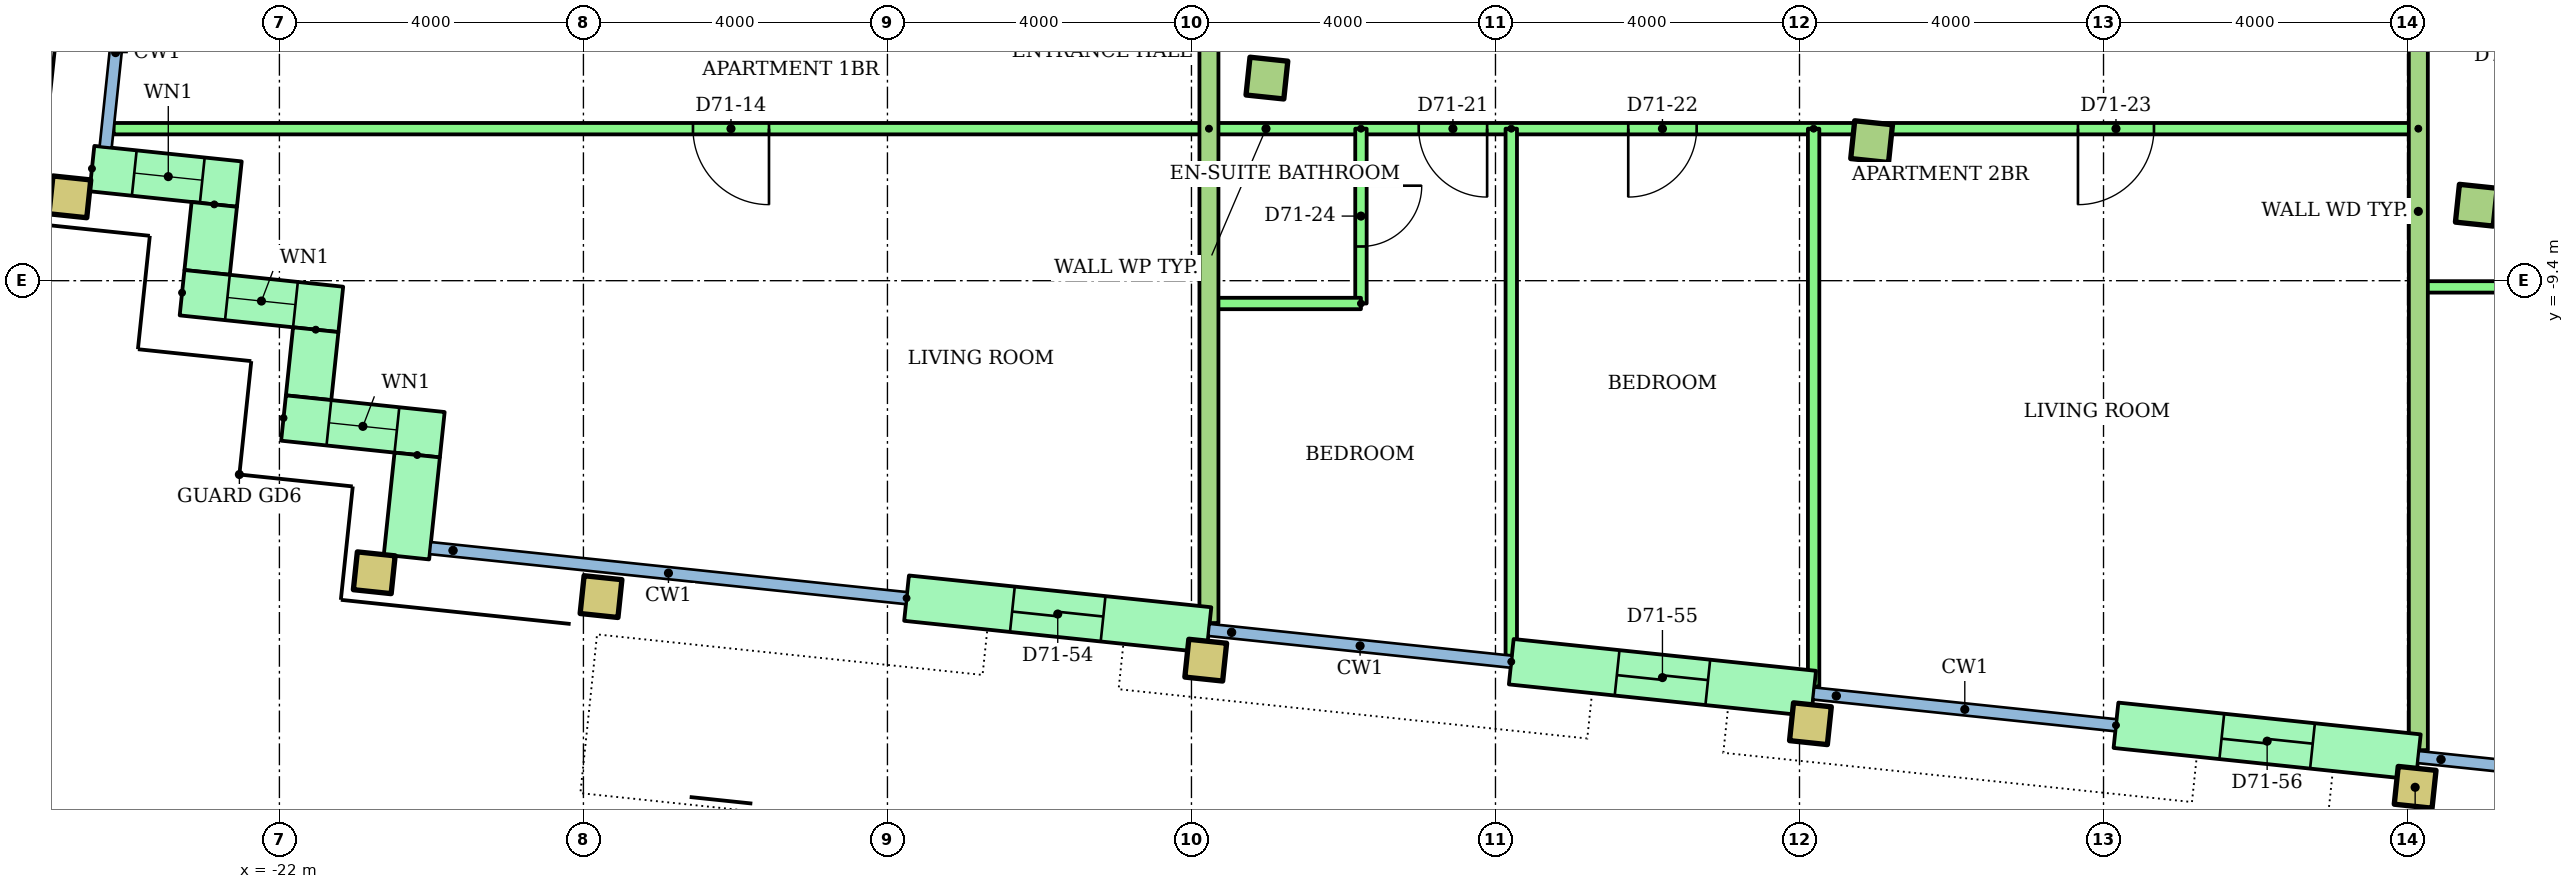
"""IFC4 building model, lengths in metres.
Left out: names, types, materials, properties, quantities, classifications, styles, units other than length and angle.
Written with IfcOpenShell. Run it as: python <this file> out.ifc"""

import sys

from ifc_helpers import new_model, si_unit, direction, frame, frame_2d, origin, origin_2d, place, context, subcontext, project, spatial, rectangle, hollow_rectangle, extrude, element, fill, save


model = new_model("IFC4")
c1 = context("Model", 3, precision=1e-05, world=origin(), true_north=direction((0.0, 1.0)))
c2 = subcontext(c1, "Body", "Model", "MODEL_VIEW")
j1 = project(units=[si_unit("LENGTHUNIT", "METRE"), si_unit("PLANEANGLEUNIT", "RADIAN")], contexts=[c1])
p1 = place(None, origin())
s1 = spatial("IfcSite", under=j1, at=p1, CompositionType="ELEMENT")
p2 = place(p1, origin())
s2 = spatial("IfcBuilding", under=s1, at=p2, CompositionType="ELEMENT")
p3 = place(p2, frame((0.0, 0.0, 272.3)))
s3 = spatial("IfcBuildingStorey", under=s2, at=p3, CompositionType="ELEMENT", Elevation=272.3)
for number, where, z_axis, x_axis in (
    (1, (-20.752, -13.243, 0.0), (0.0, 0.0, 1.0), (0.995, -0.105, 0.0)),
    (2, (-17.768, -13.556, 0.0), (0.0, 0.0, 1.0), (0.995, -0.105, 0.0)),
    (3, (-9.812, -14.392, 0.0), (0.0, 0.0, 1.0), (0.995, -0.105, 0.0)),
    (4, (-1.856, -15.229, 0.0), (0.0, 0.0, 1.0), (0.995, -0.105, 0.0)),
    (5, (6.1, -16.065, 0.0), (0.0, 0.0, 1.0), (0.995, -0.105, 0.0)),
    (6, (-24.757, -8.297, 0.0), (0.0, 0.0, 1.0), (0.995, -0.105, 0.0)),
):
    element("IfcColumn", number, at=place(p3, frame(where, z_axis=z_axis, x_axis=x_axis)), inside=s3, PredefinedType="COLUMN", context=c2, shape_type="SweptSolid", body=[
        extrude(hollow_rectangle(XDim=0.5, YDim=0.5, WallThickness=0.025, at=origin_2d()), origin(), (0.0, 0.0, 1.0), 3.2),
    ])
for number, where, z_axis, x_axis in (
    (7, (-9.007, -6.735, 0.0), (0.0, 0.0, 1.0), (0.995, -0.105, 0.0)),
    (8, (-1.051, -7.571, 0.0), (0.0, 0.0, 1.0), (0.995, -0.105, 0.0)),
    (9, (6.905, -8.407, 0.0), (0.0, 0.0, 1.0), (0.995, -0.105, 0.0)),
):
    element("IfcColumn", number, at=place(p3, frame(where, z_axis=z_axis, x_axis=x_axis)), inside=s3, PredefinedType="COLUMN", context=c2, shape_type="SweptSolid", body=[
        extrude(rectangle(XDim=0.5, YDim=0.5, at=origin_2d()), origin(), (0.0, 0.0, 1.0), 3.2),
    ])
p4 = place(p3, frame((-24.467, -7.925, 0.0), z_axis=(0.0, 0.0, 1.0), x_axis=(0.994521219184, -0.104534896528, 0.0)))
e10 = element("IfcWall", 10, at=p4, inside=s3, PredefinedType="STANDARD", context=c2, shape_type="SweptSolid", body=[
    extrude(rectangle(XDim=1.95, YDim=0.6, at=frame_2d((0.975, 0.0))), origin(), (0.0, 0.0, 1.0), 2.92),
])
p5 = place(p4, frame((0.56, 0.0, 0.9)))
e11 = element("IfcOpeningElement", 11, at=p5, cuts=e10, PredefinedType="OPENING", context=c2, shape_type="SweptSolid", body=[
    extrude(rectangle(XDim=0.9, YDim=1.5, at=frame_2d((0.45, 0.75))), frame((0.0, 0.31, 0.0), z_axis=(0.0, -1.0, 0.0), x_axis=(1.0, 0.0, 0.0)), (0.0, 0.0, 1.0), 0.62),
])
p6 = place(p3, frame((-22.857, -8.396, 0.0), z_axis=(0.0, 0.0, 1.0), x_axis=(-0.104444712852, -0.994530694326, 0.0)))
e12 = element("IfcWall", 12, at=p6, inside=s3, PredefinedType="STANDARD", context=c2, shape_type="SweptSolid", body=[
    extrude(rectangle(XDim=0.9, YDim=0.6, at=frame_2d((0.45, 0.0))), origin(), (0.0, 0.0, 1.0), 2.92),
])
p7 = place(p3, frame((-23.281, -9.558, 0.0), z_axis=(0.0, 0.0, 1.0), x_axis=(0.994523910136, -0.104509292252, 0.0)))
e13 = element("IfcWall", 13, at=p7, inside=s3, PredefinedType="STANDARD", context=c2, shape_type="SweptSolid", body=[
    extrude(rectangle(XDim=2.1, YDim=0.6, at=frame_2d((1.05, 0.0))), origin(), (0.0, 0.0, 1.0), 2.92),
])
p8 = place(p7, frame((0.6, 0.0, 0.9)))
e14 = element("IfcOpeningElement", 14, at=p8, cuts=e13, PredefinedType="OPENING", context=c2, shape_type="SweptSolid", body=[
    extrude(rectangle(XDim=0.9, YDim=1.5, at=frame_2d((0.45, 0.75))), frame((0.0, 0.31, 0.0), z_axis=(0.0, -1.0, 0.0), x_axis=(1.0, 0.0, 0.0)), (0.0, 0.0, 1.0), 0.62),
])
p9 = place(p3, frame((-21.522, -10.044, 0.0), z_axis=(0.0, 0.0, 1.0), x_axis=(-0.104416541099, -0.994533652495, 0.0)))
e15 = element("IfcWall", 15, at=p9, inside=s3, PredefinedType="STANDARD", context=c2, shape_type="SweptSolid", body=[
    extrude(rectangle(XDim=0.9, YDim=0.6, at=frame_2d((0.45, 0.0))), origin(), (0.0, 0.0, 1.0), 2.92),
])
p10 = place(p3, frame((-21.946, -11.207, 0.0), z_axis=(0.0, 0.0, 1.0), x_axis=(0.994511820899, -0.104624271047, 0.0)))
e16 = element("IfcWall", 16, at=p10, inside=s3, PredefinedType="STANDARD", context=c2, shape_type="SweptSolid", body=[
    extrude(rectangle(XDim=2.1, YDim=0.6, at=frame_2d((1.05, 0.0))), origin(), (0.0, 0.0, 1.0), 2.92),
])
p11 = place(p10, frame((0.6, 0.0, 0.9)))
e17 = element("IfcOpeningElement", 17, at=p11, cuts=e16, PredefinedType="OPENING", context=c2, shape_type="SweptSolid", body=[
    extrude(rectangle(XDim=0.9, YDim=1.5, at=frame_2d((0.45, 0.75))), frame((0.0, 0.31, 0.0), z_axis=(0.0, -1.0, 0.0), x_axis=(1.0, 0.0, 0.0)), (0.0, 0.0, 1.0), 0.62),
])
p12 = place(p3, frame((-20.187, -11.693, 0.0), z_axis=(0.0, 0.0, 1.0), x_axis=(-0.1043365026, -0.994542052517, 0.0)))
e18 = element("IfcWall", 18, at=p12, inside=s3, PredefinedType="STANDARD", context=c2, shape_type="SweptSolid", body=[
    extrude(rectangle(XDim=1.35, YDim=0.6, at=frame_2d((0.675, 0.0))), origin(), (0.0, 0.0, 1.0), 2.92),
])
p13 = place(p3, frame((-13.749, -13.576, 0.0), z_axis=(0.0, 0.0, 1.0), x_axis=(0.994519156568, -0.104554517933, 0.0)))
e19 = element("IfcWall", 19, at=p13, inside=s3, PredefinedType="STANDARD", context=c2, shape_type="SweptSolid", body=[
    extrude(rectangle(XDim=4.0, YDim=0.6, at=frame_2d((2.0, 0.0))), origin(), (0.0, 0.0, 1.0), 2.92),
])
p14 = place(p13, frame((1.4, 0.0, 0.0)))
e20 = element("IfcOpeningElement", 20, at=p14, cuts=e19, PredefinedType="OPENING", context=c2, shape_type="SweptSolid", body=[
    extrude(rectangle(XDim=1.2, YDim=2.1, at=frame_2d((0.6, 1.05))), frame((0.0, 0.31, 0.0), z_axis=(0.0, -1.0, 0.0), x_axis=(1.0, 0.0, 0.0)), (0.0, 0.0, 1.0), 0.62),
])
p15 = place(p3, frame((-5.792, -14.413, 0.0), z_axis=(0.0, 0.0, 1.0), x_axis=(0.99452550138, -0.104494148666, 0.0)))
e21 = element("IfcWall", 21, at=p15, inside=s3, PredefinedType="STANDARD", context=c2, shape_type="SweptSolid", body=[
    extrude(rectangle(XDim=4.0, YDim=0.6, at=frame_2d((2.0, 0.0))), origin(), (0.0, 0.0, 1.0), 2.92),
])
p16 = place(p15, frame((1.4, 0.0, 0.0)))
e22 = element("IfcOpeningElement", 22, at=p16, cuts=e21, PredefinedType="OPENING", context=c2, shape_type="SweptSolid", body=[
    extrude(rectangle(XDim=1.2, YDim=2.1, at=frame_2d((0.6, 1.05))), frame((0.0, 0.31, 0.0), z_axis=(0.0, -1.0, 0.0), x_axis=(1.0, 0.0, 0.0)), (0.0, 0.0, 1.0), 0.62),
])
p17 = place(p3, frame((2.164, -15.249, 0.0), z_axis=(0.0, 0.0, 1.0), x_axis=(0.99452550138, -0.104494148666, 0.0)))
e23 = element("IfcWall", 23, at=p17, inside=s3, PredefinedType="STANDARD", context=c2, shape_type="SweptSolid", body=[
    extrude(rectangle(XDim=4.0, YDim=0.6, at=frame_2d((2.0, 0.0))), origin(), (0.0, 0.0, 1.0), 2.92),
])
p18 = place(p17, frame((1.4, 0.0, 0.0)))
e24 = element("IfcOpeningElement", 24, at=p18, cuts=e23, PredefinedType="OPENING", context=c2, shape_type="SweptSolid", body=[
    extrude(rectangle(XDim=1.2, YDim=2.1, at=frame_2d((0.6, 1.05))), frame((0.0, 0.31, 0.0), z_axis=(0.0, -1.0, 0.0), x_axis=(1.0, 0.0, 0.0)), (0.0, 0.0, 1.0), 0.62),
])
p19 = place(p3, frame((-9.77, -7.4, 0.0), z_axis=(0.0, 0.0, 1.0), x_axis=(-1.0, 0.0, 0.0)))
e25 = element("IfcWall", 25, at=p19, inside=s3, PredefinedType="PARTITIONING", context=c2, shape_type="SweptSolid", body=[
    extrude(rectangle(XDim=14.411, YDim=0.15, at=frame_2d((7.206, 0.0))), origin(), (0.0, 0.0, 1.0), 2.4),
])
p20 = place(p19, frame((5.789, 0.0, 0.0)))
e26 = element("IfcOpeningElement", 26, at=p20, cuts=e25, PredefinedType="OPENING", context=c2, shape_type="SweptSolid", body=[
    extrude(rectangle(XDim=1.0, YDim=2.1, at=frame_2d((0.5, 1.05))), frame((0.0, 0.085, 0.0), z_axis=(0.0, -1.0, 0.0), x_axis=(1.0, 0.0, 0.0)), (0.0, 0.0, 1.0), 0.17),
])
p21 = place(p3, frame((6.142, -7.4, 0.0), z_axis=(0.0, 0.0, 1.0), x_axis=(-1.0, 0.0, 0.0)))
e27 = element("IfcWall", 27, at=p21, inside=s3, PredefinedType="PARTITIONING", context=c2, shape_type="SweptSolid", body=[
    extrude(rectangle(XDim=15.912, YDim=0.15, at=frame_2d((7.956, 0.0))), origin(), (0.0, 0.0, 1.0), 2.4),
])
p22 = place(p21, frame((12.252, 0.0, 0.0)))
e28 = element("IfcOpeningElement", 28, at=p22, cuts=e27, PredefinedType="OPENING", context=c2, shape_type="SweptSolid", body=[
    extrude(rectangle(XDim=0.9, YDim=2.1, at=frame_2d((0.45, 1.05))), frame((0.0, 0.085, 0.0), z_axis=(0.0, -1.0, 0.0), x_axis=(1.0, 0.0, 0.0)), (0.0, 0.0, 1.0), 0.17),
])
p23 = place(p21, frame((9.495, 0.0, 0.0)))
e29 = element("IfcOpeningElement", 29, at=p23, cuts=e27, PredefinedType="OPENING", context=c2, shape_type="SweptSolid", body=[
    extrude(rectangle(XDim=0.9, YDim=2.1, at=frame_2d((0.45, 1.05))), frame((0.0, 0.085, 0.0), z_axis=(0.0, -1.0, 0.0), x_axis=(1.0, 0.0, 0.0)), (0.0, 0.0, 1.0), 0.17),
])
p24 = place(p21, frame((3.478, 0.0, 0.0)))
e30 = element("IfcOpeningElement", 30, at=p24, cuts=e27, PredefinedType="OPENING", context=c2, shape_type="SweptSolid", body=[
    extrude(rectangle(XDim=1.0, YDim=2.1, at=frame_2d((0.5, 1.05))), frame((0.0, 0.085, 0.0), z_axis=(0.0, -1.0, 0.0), x_axis=(1.0, 0.0, 0.0)), (0.0, 0.0, 1.0), 0.17),
])
p25 = place(p3, frame((-5.792, -7.4, 0.0), z_axis=(0.0, 0.0, 1.0), x_axis=(0.0, -1.0, 0.0)))
e31 = element("IfcWall", 31, at=p25, inside=s3, PredefinedType="PARTITIONING", context=c2, shape_type="SweptSolid", body=[
    extrude(rectangle(XDim=6.933, YDim=0.15, at=frame_2d((3.467, 0.0))), origin(), (0.0, 0.0, 1.0), 2.4),
])
p26 = place(p3, frame((-1.814, -7.4, 0.0), z_axis=(0.0, 0.0, 1.0), x_axis=(0.0, -1.0, 0.0)))
e32 = element("IfcWall", 32, at=p26, inside=s3, PredefinedType="PARTITIONING", context=c2, shape_type="SweptSolid", body=[
    extrude(rectangle(XDim=7.341, YDim=0.15, at=frame_2d((3.67, 0.0))), origin(), (0.0, 0.0, 1.0), 2.4),
])
p27 = place(p3, frame((-7.77, -7.4, 0.0), z_axis=(0.0, 0.0, 1.0), x_axis=(0.0, -1.0, 0.0)))
e33 = element("IfcWall", 33, at=p27, inside=s3, PredefinedType="PARTITIONING", context=c2, shape_type="SweptSolid", body=[
    extrude(rectangle(XDim=2.3, YDim=0.15, at=frame_2d((1.15, 0.0))), origin(), (0.0, 0.0, 1.0), 2.4),
])
p28 = place(p27, frame((0.75, 0.0, 0.0)))
e34 = element("IfcOpeningElement", 34, at=p28, cuts=e33, PredefinedType="OPENING", context=c2, shape_type="SweptSolid", body=[
    extrude(rectangle(XDim=0.8, YDim=2.1, at=frame_2d((0.4, 1.05))), frame((0.0, 0.085, 0.0), z_axis=(0.0, -1.0, 0.0), x_axis=(1.0, 0.0, 0.0)), (0.0, 0.0, 1.0), 0.17),
])
p29 = place(p3, frame((-7.77, -9.7, 0.0), z_axis=(0.0, 0.0, 1.0), x_axis=(-1.0, 0.0, 0.0)))
e35 = element("IfcWall", 35, at=p29, inside=s3, PredefinedType="PARTITIONING", context=c2, shape_type="SweptSolid", body=[
    extrude(rectangle(XDim=2.0, YDim=0.15, at=frame_2d((1.0, 0.0))), origin(), (0.0, 0.0, 1.0), 2.4),
])
p30 = place(p3, frame((-9.77, -1.4, 0.0), z_axis=(0.0, 0.0, 1.0), x_axis=(0.0, -1.0, 0.0)))
e36 = element("IfcWall", 36, at=p30, inside=s3, PredefinedType="PARTITIONING", context=c2, shape_type="SweptSolid", body=[
    extrude(rectangle(XDim=12.504, YDim=0.25, at=frame_2d((6.252, 0.0))), origin(), (0.0, 0.0, 1.0), 2.4),
])
p31 = place(p3, frame((29.94, -9.482, 0.0), z_axis=(0.0, 0.0, 1.0), x_axis=(-1.0, 0.0, 0.0)))
e37 = element("IfcWall", 37, at=p31, inside=s3, PredefinedType="PARTITIONING", context=c2, shape_type="SweptSolid", body=[
    extrude(rectangle(XDim=23.798, YDim=0.15, at=frame_2d((11.899, 0.0))), origin(), (0.0, 0.0, 1.0), 2.4),
])
p32 = place(p31, frame((19.32, 0.0, 0.0)))
e38 = element("IfcOpeningElement", 38, at=p32, cuts=e37, PredefinedType="OPENING", context=c2, shape_type="SweptSolid", body=[
    extrude(rectangle(XDim=1.0, YDim=2.1, at=frame_2d((0.5, 1.05))), frame((0.0, 0.085, 0.0), z_axis=(0.0, -1.0, 0.0), x_axis=(1.0, 0.0, 0.0)), (0.0, 0.0, 1.0), 0.17),
])
p33 = place(p31, frame((13.403, 0.0, 0.0)))
e39 = element("IfcOpeningElement", 39, at=p33, cuts=e37, PredefinedType="OPENING", context=c2, shape_type="SweptSolid", body=[
    extrude(rectangle(XDim=0.9, YDim=2.1, at=frame_2d((0.45, 1.05))), frame((0.0, 0.085, 0.0), z_axis=(0.0, -1.0, 0.0), x_axis=(1.0, 0.0, 0.0)), (0.0, 0.0, 1.0), 0.17),
])
p34 = place(p31, frame((9.425, 0.0, 0.0)))
e40 = element("IfcOpeningElement", 40, at=p34, cuts=e37, PredefinedType="OPENING", context=c2, shape_type="SweptSolid", body=[
    extrude(rectangle(XDim=0.9, YDim=2.1, at=frame_2d((0.45, 1.05))), frame((0.0, 0.085, 0.0), z_axis=(0.0, -1.0, 0.0), x_axis=(1.0, 0.0, 0.0)), (0.0, 0.0, 1.0), 0.17),
])
p35 = place(p31, frame((2.434, 0.0, 0.0)))
e41 = element("IfcOpeningElement", 41, at=p35, cuts=e37, PredefinedType="OPENING", context=c2, shape_type="SweptSolid", body=[
    extrude(rectangle(XDim=0.9, YDim=2.1, at=frame_2d((0.45, 1.05))), frame((0.0, 0.085, 0.0), z_axis=(0.0, -1.0, 0.0), x_axis=(1.0, 0.0, 0.0)), (0.0, 0.0, 1.0), 0.17),
])
p36 = place(p3, frame((6.142, -1.4, 0.0), z_axis=(0.0, 0.0, 1.0), x_axis=(0.0, -1.0, 0.0)))
e42 = element("IfcWall", 42, at=p36, inside=s3, PredefinedType="PARTITIONING", context=c2, shape_type="SweptSolid", body=[
    extrude(rectangle(XDim=14.177, YDim=0.25, at=frame_2d((7.088, 0.0))), origin(), (0.0, 0.0, 1.0), 2.4),
])
p37 = place(p5, origin())
e43 = element("IfcWindow", 43, at=p37, inside=s3, PartitioningType="SINGLE_PANEL", PredefinedType="WINDOW", context=c2, shape_type="SweptSolid", body=[
    extrude(rectangle(XDim=0.9, YDim=1.5, at=frame_2d((0.45, 0.75))), frame((0.0, 0.03, 0.0), z_axis=(0.0, -1.0, 0.0), x_axis=(1.0, 0.0, 0.0)), (0.0, 0.0, 1.0), 0.06),
])
fill(e11, e43)
p38 = place(p8, origin())
e44 = element("IfcWindow", 44, at=p38, inside=s3, PartitioningType="SINGLE_PANEL", PredefinedType="WINDOW", context=c2, shape_type="SweptSolid", body=[
    extrude(rectangle(XDim=0.9, YDim=1.5, at=frame_2d((0.45, 0.75))), frame((0.0, 0.03, 0.0), z_axis=(0.0, -1.0, 0.0), x_axis=(1.0, 0.0, 0.0)), (0.0, 0.0, 1.0), 0.06),
])
fill(e14, e44)
p39 = place(p11, origin())
e45 = element("IfcWindow", 45, at=p39, inside=s3, PartitioningType="SINGLE_PANEL", PredefinedType="WINDOW", context=c2, shape_type="SweptSolid", body=[
    extrude(rectangle(XDim=0.9, YDim=1.5, at=frame_2d((0.45, 0.75))), frame((0.0, 0.03, 0.0), z_axis=(0.0, -1.0, 0.0), x_axis=(1.0, 0.0, 0.0)), (0.0, 0.0, 1.0), 0.06),
])
fill(e17, e45)
p40 = place(p20, origin())
e46 = element("IfcDoor", 46, at=p40, inside=s3, OperationType="SINGLE_SWING_LEFT", PredefinedType="DOOR", context=c2, shape_type="SweptSolid", body=[
    extrude(rectangle(XDim=1.0, YDim=2.1, at=frame_2d((0.5, 1.05))), frame((0.0, 0.025, 0.0), z_axis=(0.0, -1.0, 0.0), x_axis=(1.0, 0.0, 0.0)), (0.0, 0.0, 1.0), 0.05),
])
fill(e26, e46)
p41 = place(p22, origin())
e47 = element("IfcDoor", 47, at=p41, inside=s3, OperationType="SINGLE_SWING_LEFT", PredefinedType="DOOR", context=c2, shape_type="SweptSolid", body=[
    extrude(rectangle(XDim=0.9, YDim=2.1, at=frame_2d((0.45, 1.05))), frame((0.0, 0.025, 0.0), z_axis=(0.0, -1.0, 0.0), x_axis=(1.0, 0.0, 0.0)), (0.0, 0.0, 1.0), 0.05),
])
fill(e28, e47)
p42 = place(p23, origin())
e48 = element("IfcDoor", 48, at=p42, inside=s3, OperationType="SINGLE_SWING_RIGHT", PredefinedType="DOOR", context=c2, shape_type="SweptSolid", body=[
    extrude(rectangle(XDim=0.9, YDim=2.1, at=frame_2d((0.45, 1.05))), frame((0.0, 0.025, 0.0), z_axis=(0.0, -1.0, 0.0), x_axis=(1.0, 0.0, 0.0)), (0.0, 0.0, 1.0), 0.05),
])
fill(e29, e48)
p43 = place(p24, origin())
e49 = element("IfcDoor", 49, at=p43, inside=s3, OperationType="SINGLE_SWING_RIGHT", PredefinedType="DOOR", context=c2, shape_type="SweptSolid", body=[
    extrude(rectangle(XDim=1.0, YDim=2.1, at=frame_2d((0.5, 1.05))), frame((0.0, 0.025, 0.0), z_axis=(0.0, -1.0, 0.0), x_axis=(1.0, 0.0, 0.0)), (0.0, 0.0, 1.0), 0.05),
])
fill(e30, e49)
p44 = place(p28, origin())
e50 = element("IfcDoor", 50, at=p44, inside=s3, OperationType="SINGLE_SWING_LEFT", PredefinedType="DOOR", context=c2, shape_type="SweptSolid", body=[
    extrude(rectangle(XDim=0.8, YDim=2.1, at=frame_2d((0.4, 1.05))), frame((0.0, 0.025, 0.0), z_axis=(0.0, -1.0, 0.0), x_axis=(1.0, 0.0, 0.0)), (0.0, 0.0, 1.0), 0.05),
])
fill(e34, e50)
p45 = place(p14, origin())
e51 = element("IfcDoor", 51, at=p45, inside=s3, OperationType="SLIDING_TO_LEFT", PredefinedType="DOOR", context=c2, shape_type="SweptSolid", body=[
    extrude(rectangle(XDim=1.2, YDim=2.1, at=frame_2d((0.6, 1.05))), frame((0.0, 0.025, 0.0), z_axis=(0.0, -1.0, 0.0), x_axis=(1.0, 0.0, 0.0)), (0.0, 0.0, 1.0), 0.05),
])
fill(e20, e51)
p46 = place(p16, origin())
e52 = element("IfcDoor", 52, at=p46, inside=s3, OperationType="SLIDING_TO_LEFT", PredefinedType="DOOR", context=c2, shape_type="SweptSolid", body=[
    extrude(rectangle(XDim=1.2, YDim=2.1, at=frame_2d((0.6, 1.05))), frame((0.0, 0.025, 0.0), z_axis=(0.0, -1.0, 0.0), x_axis=(1.0, 0.0, 0.0)), (0.0, 0.0, 1.0), 0.05),
])
fill(e22, e52)
p47 = place(p18, origin())
e53 = element("IfcDoor", 53, at=p47, inside=s3, OperationType="SLIDING_TO_LEFT", PredefinedType="DOOR", context=c2, shape_type="SweptSolid", body=[
    extrude(rectangle(XDim=1.2, YDim=2.1, at=frame_2d((0.6, 1.05))), frame((0.0, 0.025, 0.0), z_axis=(0.0, -1.0, 0.0), x_axis=(1.0, 0.0, 0.0)), (0.0, 0.0, 1.0), 0.05),
])
fill(e24, e53)
save(model, sys.argv[1])
